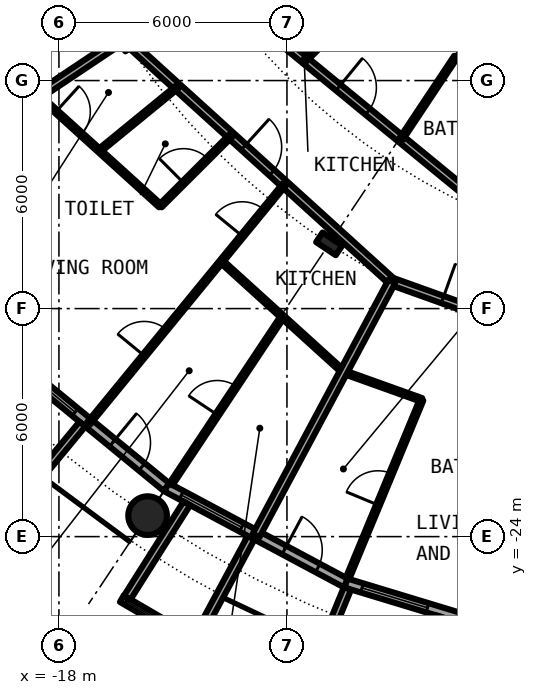
"""IFC4 building model, lengths in metres.
Left out: names, types, materials, properties, quantities, classifications, styles, units other than length and angle.
Written with IfcOpenShell. Run it as: python <this file> out.ifc"""

import sys

from ifc_helpers import new_model, si_unit, direction, frame, frame_2d, origin, origin_2d, place, context, subcontext, project, spatial, rectangle, circle, hollow_circle, i_section, extrude, element, fill, save


model = new_model("IFC4")
c1 = context("Model", 3, precision=1e-05, world=origin(), true_north=direction((0.0, 1.0)))
c2 = subcontext(c1, "Body", "Model", "MODEL_VIEW")
j1 = project(units=[si_unit("LENGTHUNIT", "METRE"), si_unit("PLANEANGLEUNIT", "RADIAN")], contexts=[c1])
p1 = place(None, origin())
s1 = spatial("IfcSite", under=j1, at=p1, CompositionType="ELEMENT")
p2 = place(p1, origin())
s2 = spatial("IfcBuilding", under=s1, at=p2, CompositionType="ELEMENT")
p3 = place(p2, frame((0.0, 0.0, 41.1)))
s3 = spatial("IfcBuildingStorey", under=s2, at=p3, CompositionType="ELEMENT", Elevation=41.1)
p4 = place(p3, frame((-15.667, -23.448, 0.0), z_axis=(0.0, 0.0, 1.0), x_axis=(1.0, 0.0, 0.0)))
e1 = element("IfcColumn", 1, at=p4, inside=s3, PredefinedType="COLUMN", context=c2, shape_type="SweptSolid", body=[
    extrude(hollow_circle(Radius=0.508, WallThickness=0.05, at=origin_2d()), origin(), (0.0, 0.0, 1.0), 3.05),
])
p5 = place(p3, frame((-10.889, -16.297, 0.0), z_axis=(0.0, 0.0, 1.0), x_axis=(-0.55557023302, -0.831469612303, 0.0)))
e2 = element("IfcColumn", 2, at=p5, inside=s3, PredefinedType="COLUMN", context=c2, shape_type="SweptSolid", body=[
    extrude(i_section(OverallWidth=0.305, OverallDepth=0.62, WebThickness=0.021, FlangeThickness=0.04, FilletRadius=0.027, at=origin_2d()), origin(), (0.0, 0.0, 1.0), 3.05),
])
p6 = place(p3, frame((-19.304, -19.304, 0.0), z_axis=(0.0, 0.0, 1.0), x_axis=(0.773019449054, -0.634382322723, 0.0)))
e3 = element("IfcWall", 3, at=p6, inside=s3, PredefinedType="SOLIDWALL", context=c2, shape_type="SweptSolid", body=[
    extrude(rectangle(XDim=5.352, YDim=0.25, at=frame_2d((2.676, 0.0))), origin(), (0.0, 0.0, 1.0), 2.7),
])
p7 = place(p6, frame((0.441, 0.0, 0.3)))
e4 = element("IfcOpeningElement", 4, at=p7, cuts=e3, PredefinedType="OPENING", context=c2, shape_type="SweptSolid", body=[
    extrude(rectangle(XDim=1.8, YDim=2.1, at=frame_2d((0.9, 1.05))), frame((0.0, 0.135, 0.0), z_axis=(0.0, -1.0, 0.0), x_axis=(1.0, 0.0, 0.0)), (0.0, 0.0, 1.0), 0.27),
])
p8 = place(p6, frame((3.51, 0.0, 0.0)))
e5 = element("IfcOpeningElement", 5, at=p8, cuts=e3, PredefinedType="OPENING", context=c2, shape_type="SweptSolid", body=[
    extrude(rectangle(XDim=1.0, YDim=2.2, at=frame_2d((0.5, 1.1))), frame((0.0, 0.135, 0.0), z_axis=(0.0, -1.0, 0.0), x_axis=(1.0, 0.0, 0.0)), (0.0, 0.0, 1.0), 0.27),
])
p9 = place(p3, frame((-17.384, -21.041, -0.03), z_axis=(0.0, 0.0, 1.0), x_axis=(-0.63709551667, -0.770784861449, 0.0)))
e6 = element("IfcWall", 6, at=p9, inside=s3, PredefinedType="SOLIDWALL", context=c2, shape_type="SweptSolid", body=[
    extrude(rectangle(XDim=3.006, YDim=0.2, at=frame_2d((1.503, 0.0))), origin(), (0.0, 0.0, 1.0), 2.73),
])
p10 = place(p3, frame((-15.167, -22.699, 0.0), z_axis=(0.0, 0.0, 1.0), x_axis=(0.881915646801, -0.471407246368, 0.0)))
e7 = element("IfcWall", 7, at=p10, inside=s3, PredefinedType="SOLIDWALL", context=c2, shape_type="SweptSolid", body=[
    extrude(rectangle(XDim=5.352, YDim=0.25, at=frame_2d((2.676, 0.0))), origin(), (0.0, 0.0, 1.0), 2.7),
])
p11 = place(p10, frame((0.441, 0.0, 0.3)))
e8 = element("IfcOpeningElement", 8, at=p11, cuts=e7, PredefinedType="OPENING", context=c2, shape_type="SweptSolid", body=[
    extrude(rectangle(XDim=1.8, YDim=2.1, at=frame_2d((0.9, 1.05))), frame((0.0, 0.135, 0.0), z_axis=(0.0, -1.0, 0.0), x_axis=(1.0, 0.0, 0.0)), (0.0, 0.0, 1.0), 0.27),
])
p12 = place(p10, frame((3.51, 0.0, 0.0)))
e9 = element("IfcOpeningElement", 9, at=p12, cuts=e7, PredefinedType="OPENING", context=c2, shape_type="SweptSolid", body=[
    extrude(rectangle(XDim=1.0, YDim=2.2, at=frame_2d((0.5, 1.1))), frame((0.0, 0.135, 0.0), z_axis=(0.0, -1.0, 0.0), x_axis=(1.0, 0.0, 0.0)), (0.0, 0.0, 1.0), 0.27),
])
p13 = place(p3, frame((-16.344, -25.633, -0.03), z_axis=(0.0, 0.0, 1.0), x_axis=(0.863346521872, -0.504611517081, 0.0)))
e10 = element("IfcWall", 10, at=p13, inside=s3, PredefinedType="SOLIDWALL", context=c2, shape_type="SweptSolid", body=[
    extrude(rectangle(XDim=2.336, YDim=0.2, at=frame_2d((1.168, 0.0))), origin(), (0.0, 0.0, 1.0), 2.73),
])
p14 = place(p13, frame((0.128, 0.0, 0.33)))
e11 = element("IfcOpeningElement", 11, at=p14, cuts=e10, PredefinedType="OPENING", context=c2, shape_type="SweptSolid", body=[
    extrude(circle(Radius=1.04, at=frame_2d((1.04, 1.04))), frame((0.0, 0.11, 0.0), z_axis=(0.0, -1.0, 0.0), x_axis=(1.0, 0.0, 0.0)), (0.0, 0.0, 1.0), 0.22),
])
p15 = place(p3, frame((-14.635, -23.126, -0.03), z_axis=(0.0, 0.0, 1.0), x_axis=(-0.534437802731, -0.845207805816, 0.0)))
e12 = element("IfcWall", 12, at=p15, inside=s3, PredefinedType="SOLIDWALL", context=c2, shape_type="SweptSolid", body=[
    extrude(rectangle(XDim=2.932, YDim=0.2, at=frame_2d((1.466, 0.0))), origin(), (0.0, 0.0, 1.0), 2.73),
])
p16 = place(p3, frame((-12.945, -24.029, -0.03), z_axis=(0.0, 0.0, 1.0), x_axis=(-0.474424310775, -0.88029629861, 0.0)))
e13 = element("IfcWall", 13, at=p16, inside=s3, PredefinedType="SOLIDWALL", context=c2, shape_type="SweptSolid", body=[
    extrude(rectangle(XDim=3.006, YDim=0.2, at=frame_2d((1.503, 0.0))), origin(), (0.0, 0.0, 1.0), 2.73),
])
p17 = place(p3, frame((-10.447, -25.222, 0.0), z_axis=(0.0, 0.0, 1.0), x_axis=(0.956965678721, -0.290201119486, 0.0)))
e14 = element("IfcWall", 14, at=p17, inside=s3, PredefinedType="SOLIDWALL", context=c2, shape_type="SweptSolid", body=[
    extrude(rectangle(XDim=5.351, YDim=0.25, at=frame_2d((2.676, 0.0))), origin(), (0.0, 0.0, 1.0), 2.7),
])
p18 = place(p17, frame((0.441, 0.0, 0.3)))
e15 = element("IfcOpeningElement", 15, at=p18, cuts=e14, PredefinedType="OPENING", context=c2, shape_type="SweptSolid", body=[
    extrude(rectangle(XDim=1.8, YDim=2.1, at=frame_2d((0.9, 1.05))), frame((0.0, 0.135, 0.0), z_axis=(0.0, -1.0, 0.0), x_axis=(1.0, 0.0, 0.0)), (0.0, 0.0, 1.0), 0.27),
])
p19 = place(p17, frame((3.51, 0.0, 0.0)))
e16 = element("IfcOpeningElement", 16, at=p19, cuts=e14, PredefinedType="OPENING", context=c2, shape_type="SweptSolid", body=[
    extrude(rectangle(XDim=1.0, YDim=2.2, at=frame_2d((0.5, 1.1))), frame((0.0, 0.135, 0.0), z_axis=(0.0, -1.0, 0.0), x_axis=(1.0, 0.0, 0.0)), (0.0, 0.0, 1.0), 0.27),
])
p20 = place(p3, frame((-10.409, -25.364, -0.03), z_axis=(0.0, 0.0, 1.0), x_axis=(-0.379509886562, -0.925187681501, 0.0)))
e17 = element("IfcWall", 17, at=p20, inside=s3, PredefinedType="SOLIDWALL", context=c2, shape_type="SweptSolid", body=[
    extrude(rectangle(XDim=2.883, YDim=0.2, at=frame_2d((1.441, 0.0))), origin(), (0.0, 0.0, 1.0), 2.73),
])
p21 = place(p3, frame((-8.009, -26.092, -0.03), z_axis=(0.0, 0.0, 1.0), x_axis=(-0.293406695073, -0.955987715029, 0.0)))
e18 = element("IfcWall", 18, at=p21, inside=s3, PredefinedType="SOLIDWALL", context=c2, shape_type="SweptSolid", body=[
    extrude(rectangle(XDim=3.006, YDim=0.2, at=frame_2d((1.503, 0.0))), origin(), (0.0, 0.0, 1.0), 2.73),
])
p22 = place(p3, frame((-10.512, -19.667, 0.0), z_axis=(0.0, 0.0, 1.0), x_axis=(0.94151635689, -0.336967282847, 0.0)))
e19 = element("IfcWall", 19, at=p22, inside=s3, PredefinedType="PARTITIONING", context=c2, shape_type="SweptSolid", body=[
    extrude(rectangle(XDim=2.182, YDim=0.1, at=frame_2d((1.091, 0.0))), origin(), (0.0, 0.0, 1.0), 2.7),
])
p23 = place(p3, frame((-18.545, -12.387, 0.0), z_axis=(0.0, 0.0, 1.0), x_axis=(0.740948416939, -0.671561943112, 0.0)))
e20 = element("IfcWall", 20, at=p23, inside=s3, PredefinedType="PARTITIONING", context=c2, shape_type="SweptSolid", body=[
    extrude(rectangle(XDim=4.335, YDim=0.1, at=frame_2d((2.167, 0.0))), origin(), (0.0, 0.0, 1.0), 2.7),
])
p24 = place(p23, frame((0.636, 0.0, 0.0)))
e21 = element("IfcOpeningElement", 21, at=p24, cuts=e20, PredefinedType="OPENING", context=c2, shape_type="SweptSolid", body=[
    extrude(rectangle(XDim=0.9, YDim=2.3, at=frame_2d((0.45, 1.15))), frame((0.0, 0.06, 0.0), z_axis=(0.0, -1.0, 0.0), x_axis=(1.0, 0.0, 0.0)), (0.0, 0.0, 1.0), 0.12),
])
p25 = place(p3, frame((-13.727, -16.754, 0.0), z_axis=(0.0, 0.0, 1.0), x_axis=(0.740840803797, -0.671680655839, 0.0)))
e22 = element("IfcWall", 22, at=p25, inside=s3, PredefinedType="PARTITIONING", context=c2, shape_type="SweptSolid", body=[
    extrude(rectangle(XDim=4.338, YDim=0.1, at=frame_2d((2.169, 0.0))), origin(), (0.0, 0.0, 1.0), 2.7),
])
p26 = place(p3, frame((-9.239, -17.286, 0.0), z_axis=(0.0, 0.0, 1.0), x_axis=(0.94157995483, -0.336789531699, 0.0)))
e23 = element("IfcWall", 23, at=p26, inside=s3, PredefinedType="PARTITIONING", context=c2, shape_type="SweptSolid", body=[
    extrude(rectangle(XDim=5.597, YDim=0.2, at=frame_2d((2.798, 0.0))), origin(), (0.0, 0.0, 1.0), 2.38),
])
p27 = place(p26, frame((1.417, 0.0, 0.0)))
e24 = element("IfcOpeningElement", 24, at=p27, cuts=e23, PredefinedType="OPENING", context=c2, shape_type="SweptSolid", body=[
    extrude(rectangle(XDim=1.0, YDim=2.3, at=frame_2d((0.5, 1.15))), frame((0.0, 0.11, 0.0), z_axis=(0.0, -1.0, 0.0), x_axis=(1.0, 0.0, 0.0)), (0.0, 0.0, 1.0), 0.22),
])
p28 = place(p3, frame((-16.179, -10.994, 0.0), z_axis=(0.0, 0.0, 1.0), x_axis=(0.740659568799, -0.671880497668, 0.0)))
e25 = element("IfcWall", 25, at=p28, inside=s3, PredefinedType="PARTITIONING", context=c2, shape_type="SweptSolid", body=[
    extrude(rectangle(XDim=9.36, YDim=0.2, at=frame_2d((4.68, 0.0))), origin(), (0.0, 0.0, 1.0), 2.38),
])
p29 = place(p28, frame((4.105, 0.0, 0.0)))
e26 = element("IfcOpeningElement", 26, at=p29, cuts=e25, PredefinedType="OPENING", context=c2, shape_type="SweptSolid", body=[
    extrude(rectangle(XDim=1.0, YDim=2.3, at=frame_2d((0.5, 1.15))), frame((0.0, 0.11, 0.0), z_axis=(0.0, -1.0, 0.0), x_axis=(1.0, 0.0, 0.0)), (0.0, 0.0, 1.0), 0.22),
])
p30 = place(p3, frame((-14.038, -9.402, 0.0), z_axis=(0.0, 0.0, 1.0), x_axis=(0.773084654695, -0.634302858794, 0.0)))
e27 = element("IfcWall", 27, at=p30, inside=s3, PredefinedType="PARTITIONING", context=c2, shape_type="SweptSolid", body=[
    extrude(rectangle(XDim=9.793, YDim=0.2, at=frame_2d((4.896, 0.0))), origin(), (0.0, 0.0, 1.0), 2.7),
])
p31 = place(p30, frame((4.387, 0.0, 0.0)))
e28 = element("IfcOpeningElement", 28, at=p31, cuts=e27, PredefinedType="OPENING", context=c2, shape_type="SweptSolid", body=[
    extrude(rectangle(XDim=1.0, YDim=2.3, at=frame_2d((0.5, 1.15))), frame((0.0, 0.11, 0.0), z_axis=(0.0, -1.0, 0.0), x_axis=(1.0, 0.0, 0.0)), (0.0, 0.0, 1.0), 0.22),
])
p32 = place(p3, frame((-7.558, -11.376, 0.0), z_axis=(0.0, 0.0, 1.0), x_axis=(0.773049907698, -0.634345205868, 0.0)))
e29 = element("IfcWall", 29, at=p32, inside=s3, PredefinedType="PARTITIONING", context=c2, shape_type="SweptSolid", body=[
    extrude(rectangle(XDim=2.748, YDim=0.1, at=frame_2d((1.374, 0.0))), origin(), (0.0, 0.0, 1.0), 2.7),
])
p33 = place(p32, frame((0.924, 0.0, 0.0)))
e30 = element("IfcOpeningElement", 30, at=p33, cuts=e29, PredefinedType="OPENING", context=c2, shape_type="SweptSolid", body=[
    extrude(rectangle(XDim=0.9, YDim=2.3, at=frame_2d((0.45, 1.15))), frame((0.0, 0.06, 0.0), z_axis=(0.0, -1.0, 0.0), x_axis=(1.0, 0.0, 0.0)), (0.0, 0.0, 1.0), 0.12),
])
p34 = place(p3, frame((-22.595, -15.097, 0.0), z_axis=(0.0, 0.0, 1.0), x_axis=(0.831465568067, 0.555576285599, 0.0)))
e31 = element("IfcWall", 31, at=p34, inside=s3, PredefinedType="PARTITIONING", context=c2, shape_type="SweptSolid", body=[
    extrude(rectangle(XDim=7.264, YDim=0.2, at=frame_2d((3.632, 0.0))), origin(), (0.0, 0.0, 1.0), 2.7),
])
p35 = place(p3, frame((-17.22, -21.022, 0.0), z_axis=(0.0, 0.0, 1.0), x_axis=(0.633794691983, 0.773501317655, 0.0)))
e32 = element("IfcWall", 32, at=p35, inside=s3, PredefinedType="PARTITIONING", context=c2, shape_type="SweptSolid", body=[
    extrude(rectangle(XDim=8.138, YDim=0.1, at=frame_2d((4.069, 0.0))), origin(), (0.0, 0.0, 1.0), 2.7),
])
p36 = place(p35, frame((6.377, 0.0, 0.0)))
e33 = element("IfcOpeningElement", 33, at=p36, cuts=e32, PredefinedType="OPENING", context=c2, shape_type="SweptSolid", body=[
    extrude(rectangle(XDim=0.9, YDim=2.3, at=frame_2d((0.45, 1.15))), frame((0.0, 0.06, 0.0), z_axis=(0.0, -1.0, 0.0), x_axis=(1.0, 0.0, 0.0)), (0.0, 0.0, 1.0), 0.12),
])
p37 = place(p35, frame((2.306, 0.0, 0.0)))
e34 = element("IfcOpeningElement", 34, at=p37, cuts=e32, PredefinedType="OPENING", context=c2, shape_type="SweptSolid", body=[
    extrude(rectangle(XDim=0.9, YDim=2.3, at=frame_2d((0.45, 1.15))), frame((0.0, 0.06, 0.0), z_axis=(0.0, -1.0, 0.0), x_axis=(1.0, 0.0, 0.0)), (0.0, 0.0, 1.0), 0.12),
])
p38 = place(p3, frame((-16.936, -13.845, 0.0), z_axis=(0.0, 0.0, 1.0), x_axis=(0.774162545943, 0.632986850147, 0.0)))
e35 = element("IfcWall", 35, at=p38, inside=s3, PredefinedType="PARTITIONING", context=c2, shape_type="SweptSolid", body=[
    extrude(rectangle(XDim=2.649, YDim=0.1, at=frame_2d((1.325, 0.0))), origin(), (0.0, 0.0, 1.0), 2.7),
])
p39 = place(p3, frame((-15.33, -15.3, 0.0), z_axis=(0.0, 0.0, 1.0), x_axis=(0.707851299421, 0.706361478217, 0.0)))
e36 = element("IfcWall", 36, at=p39, inside=s3, PredefinedType="PARTITIONING", context=c2, shape_type="SweptSolid", body=[
    extrude(rectangle(XDim=2.622, YDim=0.1, at=frame_2d((1.311, 0.0))), origin(), (0.0, 0.0, 1.0), 2.7),
])
p40 = place(p39, frame((0.861, 0.0, 0.0)))
e37 = element("IfcOpeningElement", 37, at=p40, cuts=e36, PredefinedType="OPENING", context=c2, shape_type="SweptSolid", body=[
    extrude(rectangle(XDim=0.9, YDim=2.3, at=frame_2d((0.45, 1.15))), frame((0.0, 0.06, 0.0), z_axis=(0.0, -1.0, 0.0), x_axis=(1.0, 0.0, 0.0)), (0.0, 0.0, 1.0), 0.12),
])
p41 = place(p3, frame((-15.054, -22.624, 0.0), z_axis=(0.0, 0.0, 1.0), x_axis=(0.553913391217, 0.832574294, 0.0)))
e38 = element("IfcWall", 38, at=p41, inside=s3, PredefinedType="PARTITIONING", context=c2, shape_type="SweptSolid", body=[
    extrude(rectangle(XDim=5.301, YDim=0.1, at=frame_2d((2.65, 0.0))), origin(), (0.0, 0.0, 1.0), 2.7),
])
p42 = place(p41, frame((2.2, 0.0, 0.0)))
e39 = element("IfcOpeningElement", 39, at=p42, cuts=e38, PredefinedType="OPENING", context=c2, shape_type="SweptSolid", body=[
    extrude(rectangle(XDim=0.9, YDim=2.3, at=frame_2d((0.45, 1.15))), frame((0.0, 0.06, 0.0), z_axis=(0.0, -1.0, 0.0), x_axis=(1.0, 0.0, 0.0)), (0.0, 0.0, 1.0), 0.12),
])
p43 = place(p3, frame((-12.81, -23.966, 0.0), z_axis=(0.0, 0.0, 1.0), x_axis=(0.471439510802, 0.881898399848, 0.0)))
e40 = element("IfcWall", 40, at=p43, inside=s3, PredefinedType="PARTITIONING", context=c2, shape_type="SweptSolid", body=[
    extrude(rectangle(XDim=7.575, YDim=0.2, at=frame_2d((3.787, 0.0))), origin(), (0.0, 0.0, 1.0), 2.7),
])
p44 = place(p3, frame((-11.524, -11.464, 0.0), z_axis=(0.0, 0.0, 1.0), x_axis=(0.708796844581, 0.705412668665, 0.0)))
e41 = element("IfcWall", 41, at=p44, inside=s3, PredefinedType="PARTITIONING", context=c2, shape_type="SweptSolid", body=[
    extrude(rectangle(XDim=2.597, YDim=0.1, at=frame_2d((1.299, 0.0))), origin(), (0.0, 0.0, 1.0), 2.7),
])
p45 = place(p44, frame((0.849, 0.0, 0.0)))
e42 = element("IfcOpeningElement", 42, at=p45, cuts=e41, PredefinedType="OPENING", context=c2, shape_type="SweptSolid", body=[
    extrude(rectangle(XDim=0.9, YDim=2.3, at=frame_2d((0.45, 1.15))), frame((0.0, 0.06, 0.0), z_axis=(0.0, -1.0, 0.0), x_axis=(1.0, 0.0, 0.0)), (0.0, 0.0, 1.0), 0.12),
])
p46 = place(p3, frame((-10.407, -25.103, 0.0), z_axis=(0.0, 0.0, 1.0), x_axis=(0.382983071721, 0.923755360891, 0.0)))
e43 = element("IfcWall", 43, at=p46, inside=s3, PredefinedType="PARTITIONING", context=c2, shape_type="SweptSolid", body=[
    extrude(rectangle(XDim=5.089, YDim=0.1, at=frame_2d((2.544, 0.0))), origin(), (0.0, 0.0, 1.0), 2.7),
])
p47 = place(p46, frame((2.095, 0.0, 0.0)))
e44 = element("IfcOpeningElement", 44, at=p47, cuts=e43, PredefinedType="OPENING", context=c2, shape_type="SweptSolid", body=[
    extrude(rectangle(XDim=0.9, YDim=2.3, at=frame_2d((0.45, 1.15))), frame((0.0, 0.06, 0.0), z_axis=(0.0, -1.0, 0.0), x_axis=(1.0, 0.0, 0.0)), (0.0, 0.0, 1.0), 0.12),
])
p48 = place(p3, frame((-8.996, -13.539, 0.0), z_axis=(0.0, 0.0, 1.0), x_axis=(0.553615197403, 0.83277260594, 0.0)))
e45 = element("IfcWall", 45, at=p48, inside=s3, PredefinedType="PARTITIONING", context=c2, shape_type="SweptSolid", body=[
    extrude(rectangle(XDim=2.597, YDim=0.1, at=frame_2d((1.299, 0.0))), origin(), (0.0, 0.0, 1.0), 2.7),
])
p49 = place(p7, origin())
e46 = element("IfcWindow", 46, at=p49, inside=s3, PartitioningType="SINGLE_PANEL", PredefinedType="WINDOW", context=c2, shape_type="SweptSolid", body=[
    extrude(rectangle(XDim=1.8, YDim=2.1, at=frame_2d((0.9, 1.05))), frame((0.0, 0.03, 0.0), z_axis=(0.0, -1.0, 0.0), x_axis=(1.0, 0.0, 0.0)), (0.0, 0.0, 1.0), 0.06),
])
fill(e4, e46)
p50 = place(p8, origin())
e47 = element("IfcDoor", 47, at=p50, inside=s3, OperationType="SINGLE_SWING_LEFT", PredefinedType="DOOR", context=c2, shape_type="SweptSolid", body=[
    extrude(rectangle(XDim=1.0, YDim=2.2, at=frame_2d((0.5, 1.1))), frame((0.0, 0.025, 0.0), z_axis=(0.0, -1.0, 0.0), x_axis=(1.0, 0.0, 0.0)), (0.0, 0.0, 1.0), 0.05),
])
fill(e5, e47)
p51 = place(p11, origin())
e48 = element("IfcWindow", 48, at=p51, inside=s3, PartitioningType="SINGLE_PANEL", PredefinedType="WINDOW", context=c2, shape_type="SweptSolid", body=[
    extrude(rectangle(XDim=1.8, YDim=2.1, at=frame_2d((0.9, 1.05))), frame((0.0, 0.03, 0.0), z_axis=(0.0, -1.0, 0.0), x_axis=(1.0, 0.0, 0.0)), (0.0, 0.0, 1.0), 0.06),
])
fill(e8, e48)
p52 = place(p14, origin())
e49 = element("IfcWindow", 49, at=p52, inside=s3, PartitioningType="SINGLE_PANEL", PredefinedType="WINDOW", context=c2, shape_type="SweptSolid", body=[
    extrude(circle(Radius=1.04, at=frame_2d((1.04, 1.04))), frame((0.0, 0.03, 0.0), z_axis=(0.0, -1.0, 0.0), x_axis=(1.0, 0.0, 0.0)), (0.0, 0.0, 1.0), 0.06),
])
fill(e11, e49)
p53 = place(p12, origin())
e50 = element("IfcDoor", 50, at=p53, inside=s3, OperationType="SINGLE_SWING_LEFT", PredefinedType="DOOR", context=c2, shape_type="SweptSolid", body=[
    extrude(rectangle(XDim=1.0, YDim=2.2, at=frame_2d((0.5, 1.1))), frame((0.0, 0.025, 0.0), z_axis=(0.0, -1.0, 0.0), x_axis=(1.0, 0.0, 0.0)), (0.0, 0.0, 1.0), 0.05),
])
fill(e9, e50)
p54 = place(p18, origin())
e51 = element("IfcWindow", 51, at=p54, inside=s3, PartitioningType="SINGLE_PANEL", PredefinedType="WINDOW", context=c2, shape_type="SweptSolid", body=[
    extrude(rectangle(XDim=1.8, YDim=2.1, at=frame_2d((0.9, 1.05))), frame((0.0, 0.03, 0.0), z_axis=(0.0, -1.0, 0.0), x_axis=(1.0, 0.0, 0.0)), (0.0, 0.0, 1.0), 0.06),
])
fill(e15, e51)
p55 = place(p29, origin())
e52 = element("IfcDoor", 52, at=p55, inside=s3, OperationType="SINGLE_SWING_LEFT", PredefinedType="DOOR", context=c2, shape_type="SweptSolid", body=[
    extrude(rectangle(XDim=1.0, YDim=2.3, at=frame_2d((0.5, 1.15))), frame((0.0, 0.025, 0.0), z_axis=(0.0, -1.0, 0.0), x_axis=(1.0, 0.0, 0.0)), (0.0, 0.0, 1.0), 0.05),
])
fill(e26, e52)
p56 = place(p24, origin())
e53 = element("IfcDoor", 53, at=p56, inside=s3, OperationType="SINGLE_SWING_LEFT", PredefinedType="DOOR", context=c2, shape_type="SweptSolid", body=[
    extrude(rectangle(XDim=0.9, YDim=2.3, at=frame_2d((0.45, 1.15))), frame((0.0, 0.025, 0.0), z_axis=(0.0, -1.0, 0.0), x_axis=(1.0, 0.0, 0.0)), (0.0, 0.0, 1.0), 0.05),
])
fill(e21, e53)
p57 = place(p40, origin())
e54 = element("IfcDoor", 54, at=p57, inside=s3, OperationType="SINGLE_SWING_RIGHT", PredefinedType="DOOR", context=c2, shape_type="SweptSolid", body=[
    extrude(rectangle(XDim=0.9, YDim=2.3, at=frame_2d((0.45, 1.15))), frame((0.0, 0.025, 0.0), z_axis=(0.0, -1.0, 0.0), x_axis=(1.0, 0.0, 0.0)), (0.0, 0.0, 1.0), 0.05),
])
fill(e37, e54)
p58 = place(p36, origin())
e55 = element("IfcDoor", 55, at=p58, inside=s3, OperationType="SINGLE_SWING_RIGHT", PredefinedType="DOOR", context=c2, shape_type="SweptSolid", body=[
    extrude(rectangle(XDim=0.9, YDim=2.3, at=frame_2d((0.45, 1.15))), frame((0.0, 0.025, 0.0), z_axis=(0.0, -1.0, 0.0), x_axis=(1.0, 0.0, 0.0)), (0.0, 0.0, 1.0), 0.05),
])
fill(e33, e55)
p59 = place(p37, origin())
e56 = element("IfcDoor", 56, at=p59, inside=s3, OperationType="SINGLE_SWING_LEFT", PredefinedType="DOOR", context=c2, shape_type="SweptSolid", body=[
    extrude(rectangle(XDim=0.9, YDim=2.3, at=frame_2d((0.45, 1.15))), frame((0.0, 0.025, 0.0), z_axis=(0.0, -1.0, 0.0), x_axis=(1.0, 0.0, 0.0)), (0.0, 0.0, 1.0), 0.05),
])
fill(e34, e56)
p60 = place(p42, origin())
e57 = element("IfcDoor", 57, at=p60, inside=s3, OperationType="SINGLE_SWING_RIGHT", PredefinedType="DOOR", context=c2, shape_type="SweptSolid", body=[
    extrude(rectangle(XDim=0.9, YDim=2.3, at=frame_2d((0.45, 1.15))), frame((0.0, 0.025, 0.0), z_axis=(0.0, -1.0, 0.0), x_axis=(1.0, 0.0, 0.0)), (0.0, 0.0, 1.0), 0.05),
])
fill(e39, e57)
p61 = place(p27, origin())
e58 = element("IfcDoor", 58, at=p61, inside=s3, OperationType="SINGLE_SWING_LEFT", PredefinedType="DOOR", context=c2, shape_type="SweptSolid", body=[
    extrude(rectangle(XDim=1.0, YDim=2.3, at=frame_2d((0.5, 1.15))), frame((0.0, 0.025, 0.0), z_axis=(0.0, -1.0, 0.0), x_axis=(1.0, 0.0, 0.0)), (0.0, 0.0, 1.0), 0.05),
])
fill(e24, e58)
p62 = place(p47, origin())
e59 = element("IfcDoor", 59, at=p62, inside=s3, OperationType="SINGLE_SWING_RIGHT", PredefinedType="DOOR", context=c2, shape_type="SweptSolid", body=[
    extrude(rectangle(XDim=0.9, YDim=2.3, at=frame_2d((0.45, 1.15))), frame((0.0, 0.025, 0.0), z_axis=(0.0, -1.0, 0.0), x_axis=(1.0, 0.0, 0.0)), (0.0, 0.0, 1.0), 0.05),
])
fill(e44, e59)
p63 = place(p31, origin())
e60 = element("IfcDoor", 60, at=p63, inside=s3, OperationType="SINGLE_SWING_LEFT", PredefinedType="DOOR", context=c2, shape_type="SweptSolid", body=[
    extrude(rectangle(XDim=1.0, YDim=2.3, at=frame_2d((0.5, 1.15))), frame((0.0, 0.025, 0.0), z_axis=(0.0, -1.0, 0.0), x_axis=(1.0, 0.0, 0.0)), (0.0, 0.0, 1.0), 0.05),
])
fill(e28, e60)
save(model, sys.argv[1])
